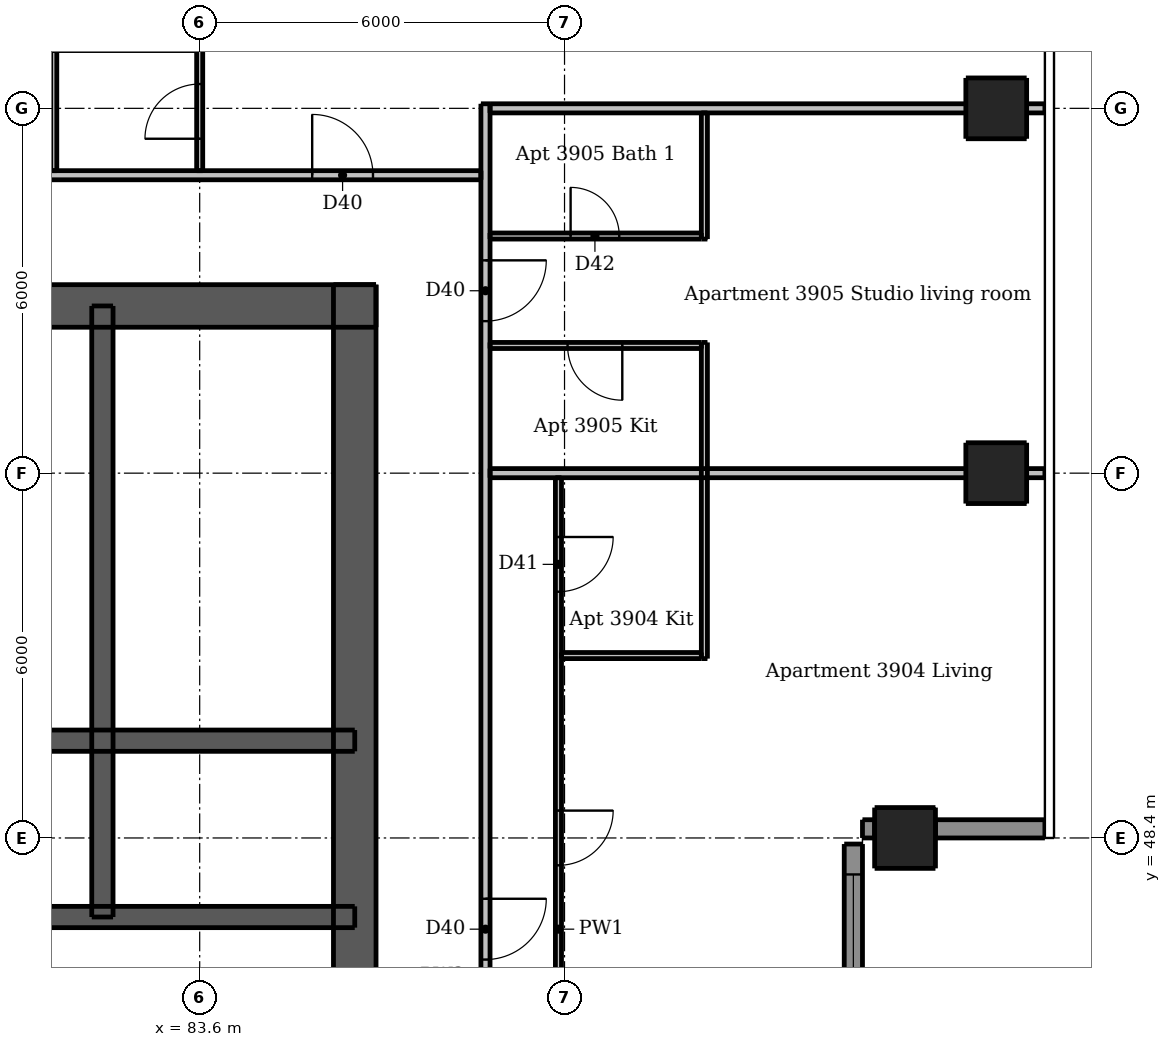
"""IFC4 building model, lengths in metres.
Left out: names, types, materials, properties, quantities, classifications, styles, units other than length and angle.
Written with IfcOpenShell. Run it as: python <this file> out.ifc"""

import sys

from ifc_helpers import new_model, si_unit, direction, frame, frame_2d, origin, origin_2d, place, context, subcontext, project, spatial, rectangle, extrude, element, fill, save


model = new_model("IFC4")
c1 = context("Model", 3, precision=1e-05, world=origin(), true_north=direction((0.0, 1.0)))
c2 = subcontext(c1, "Body", "Model", "MODEL_VIEW")
j1 = project(units=[si_unit("LENGTHUNIT", "METRE"), si_unit("PLANEANGLEUNIT", "RADIAN")], contexts=[c1])
p1 = place(None, origin())
s1 = spatial("IfcSite", under=j1, at=p1, CompositionType="ELEMENT")
p2 = place(p1, origin())
s2 = spatial("IfcBuilding", under=s1, at=p2, CompositionType="ELEMENT")
p3 = place(p2, frame((0.0, 0.0, 147.1)))
s3 = spatial("IfcBuildingStorey", under=s2, at=p3, CompositionType="ELEMENT", Elevation=147.1)
p4 = place(p3, frame((62.5, 57.15, 0.0), z_axis=(0.0, 0.0, 1.0), x_axis=(1.0, 0.0, 0.0)))
e1 = element("IfcWall", 1, at=p4, inside=s3, PredefinedType="SHEAR", context=c2, shape_type="SweptSolid", body=[
    extrude(rectangle(XDim=24.0, YDim=0.7, at=frame_2d((12.0, 0.0))), origin(), (0.0, 0.0, 1.0), 3.0),
])
p5 = place(p4, frame((20.938, 0.0, 0.0)))
e2 = element("IfcOpeningElement", 2, at=p5, cuts=e1, PredefinedType="OPENING", context=c2, shape_type="SweptSolid", body=[
    extrude(rectangle(XDim=1.1, YDim=2.1, at=frame_2d((0.55, 1.05))), frame((0.0, 0.36, 0.0), z_axis=(0.0, -1.0, 0.0), x_axis=(1.0, 0.0, 0.0)), (0.0, 0.0, 1.0), 0.72),
])
p6 = place(p4, frame((1.962, 0.0, 0.0)))
e3 = element("IfcOpeningElement", 3, at=p6, cuts=e1, PredefinedType="OPENING", context=c2, shape_type="SweptSolid", body=[
    extrude(rectangle(XDim=1.1, YDim=2.1, at=frame_2d((0.55, 1.05))), frame((0.0, 0.36, 0.0), z_axis=(0.0, -1.0, 0.0), x_axis=(1.0, 0.0, 0.0)), (0.0, 0.0, 1.0), 0.72),
])
p7 = place(p4, frame((7.887, 0.0, 0.0)))
e4 = element("IfcOpeningElement", 4, at=p7, cuts=e1, PredefinedType="OPENING", context=c2, shape_type="SweptSolid", body=[
    extrude(rectangle(XDim=0.9, YDim=2.1, at=frame_2d((0.45, 1.05))), frame((0.0, 0.36, 0.0), z_axis=(0.0, -1.0, 0.0), x_axis=(1.0, 0.0, 0.0)), (0.0, 0.0, 1.0), 0.72),
])
p8 = place(p4, frame((15.212, 0.0, 0.0)))
e5 = element("IfcOpeningElement", 5, at=p8, cuts=e1, PredefinedType="OPENING", context=c2, shape_type="SweptSolid", body=[
    extrude(rectangle(XDim=0.9, YDim=2.1, at=frame_2d((0.45, 1.05))), frame((0.0, 0.36, 0.0), z_axis=(0.0, -1.0, 0.0), x_axis=(1.0, 0.0, 0.0)), (0.0, 0.0, 1.0), 0.72),
])
p9 = place(p3, frame((86.15, 33.5, 0.0), z_axis=(0.0, 0.0, 1.0), x_axis=(0.0, 1.0, 0.0)))
e6 = element("IfcWall", 6, at=p9, inside=s3, PredefinedType="SHEAR", context=c2, shape_type="SweptSolid", body=[
    extrude(rectangle(XDim=24.0, YDim=0.7, at=frame_2d((12.0, 0.0))), origin(), (0.0, 0.0, 1.0), 3.0),
])
p10 = place(p9, frame((11.2, 0.0, 0.0)))
e7 = element("IfcOpeningElement", 7, at=p10, cuts=e6, PredefinedType="OPENING", context=c2, shape_type="SweptSolid", body=[
    extrude(rectangle(XDim=1.6, YDim=2.1, at=frame_2d((0.8, 1.05))), frame((0.0, 0.36, 0.0), z_axis=(0.0, -1.0, 0.0), x_axis=(1.0, 0.0, 0.0)), (0.0, 0.0, 1.0), 0.72),
])
p11 = place(p3, frame((62.85, 47.1, 0.0), z_axis=(0.0, 0.0, 1.0), x_axis=(1.0, 0.0, 0.0)))
e8 = element("IfcWall", 8, at=p11, inside=s3, PredefinedType="SHEAR", context=c2, shape_type="SweptSolid", body=[
    extrude(rectangle(XDim=23.3, YDim=0.35, at=frame_2d((11.65, 0.0))), origin(), (0.0, 0.0, 1.0), 3.0),
])
p12 = place(p11, frame((1.06, 0.0, 0.0)))
e9 = element("IfcOpeningElement", 9, at=p12, cuts=e8, PredefinedType="OPENING", context=c2, shape_type="SweptSolid", body=[
    extrude(rectangle(XDim=0.9, YDim=2.1, at=frame_2d((0.45, 1.05))), frame((0.0, 0.185, 0.0), z_axis=(0.0, -1.0, 0.0), x_axis=(1.0, 0.0, 0.0)), (0.0, 0.0, 1.0), 0.37),
])
p13 = place(p11, frame((2.923, 0.0, 0.0)))
e10 = element("IfcOpeningElement", 10, at=p13, cuts=e8, PredefinedType="OPENING", context=c2, shape_type="SweptSolid", body=[
    extrude(rectangle(XDim=0.8, YDim=2.1, at=frame_2d((0.4, 1.05))), frame((0.0, 0.185, 0.0), z_axis=(0.0, -1.0, 0.0), x_axis=(1.0, 0.0, 0.0)), (0.0, 0.0, 1.0), 0.37),
])
p14 = place(p11, frame((20.688, 0.0, 0.0)))
e11 = element("IfcOpeningElement", 11, at=p14, cuts=e8, PredefinedType="OPENING", context=c2, shape_type="SweptSolid", body=[
    extrude(rectangle(XDim=0.9, YDim=2.1, at=frame_2d((0.45, 1.05))), frame((0.0, 0.185, 0.0), z_axis=(0.0, -1.0, 0.0), x_axis=(1.0, 0.0, 0.0)), (0.0, 0.0, 1.0), 0.37),
])
p15 = place(p3, frame((62.85, 50.0, 0.0), z_axis=(0.0, 0.0, 1.0), x_axis=(1.0, 0.0, 0.0)))
e12 = element("IfcWall", 12, at=p15, inside=s3, PredefinedType="SHEAR", context=c2, shape_type="SweptSolid", body=[
    extrude(rectangle(XDim=23.3, YDim=0.35, at=frame_2d((11.65, 0.0))), origin(), (0.0, 0.0, 1.0), 3.0),
])
p16 = place(p3, frame((82.0, 47.1, 0.0), z_axis=(0.0, 0.0, 1.0), x_axis=(0.0, 1.0, 0.0)))
e13 = element("IfcWall", 13, at=p16, inside=s3, PredefinedType="SHEAR", context=c2, shape_type="SweptSolid", body=[
    extrude(rectangle(XDim=10.05, YDim=0.35, at=frame_2d((5.025, 0.0))), origin(), (0.0, 0.0, 1.0), 3.0),
])
for number, where, z_axis, x_axis in (
    (14, (95.2, 48.4, 0.0), (0.0, 0.0, 1.0), (1.0, 0.0, 0.0)),
    (15, (96.7, 54.4, 0.0), (0.0, 0.0, 1.0), (1.0, 0.0, 0.0)),
    (16, (96.7, 60.4, 0.0), (0.0, 0.0, 1.0), (1.0, 0.0, 0.0)),
):
    element("IfcColumn", number, at=place(p3, frame(where, z_axis=z_axis, x_axis=x_axis)), inside=s3, PredefinedType="COLUMN", context=c2, shape_type="SweptSolid", body=[
        extrude(rectangle(XDim=1.0, YDim=1.0, at=origin_2d()), origin(), (0.0, 0.0, 1.0), 3.0),
    ])
p17 = place(p3, frame((94.5, 48.55, 0.0), z_axis=(0.0, 0.0, 1.0), x_axis=(1.0, 0.0, 0.0)))
e17 = element("IfcWall", 17, at=p17, inside=s3, PredefinedType="SOLIDWALL", context=c2, shape_type="SweptSolid", body=[
    extrude(rectangle(XDim=0.2, YDim=0.3, at=frame_2d((0.1, 0.0))), origin(), (0.0, 0.0, 1.0), 3.0),
])
p18 = place(p3, frame((95.7, 48.55, 0.0), z_axis=(0.0, 0.0, 1.0), x_axis=(1.0, 0.0, 0.0)))
e18 = element("IfcWall", 18, at=p18, inside=s3, PredefinedType="SOLIDWALL", context=c2, shape_type="SweptSolid", body=[
    extrude(rectangle(XDim=1.8, YDim=0.3, at=frame_2d((0.9, 0.0))), origin(), (0.0, 0.0, 1.0), 3.0),
])
p19 = place(p3, frame((94.35, 42.5, 0.0), z_axis=(0.0, 0.0, 1.0), x_axis=(0.0, 1.0, 0.0)))
e19 = element("IfcWall", 19, at=p19, inside=s3, PredefinedType="SOLIDWALL", context=c2, shape_type="SweptSolid", body=[
    extrude(rectangle(XDim=5.8, YDim=0.3, at=frame_2d((2.9, 0.0))), origin(), (0.0, 0.0, 1.0), 3.0),
])
p20 = place(p19, frame((0.5, 0.0, 0.15)))
e20 = element("IfcOpeningElement", 20, at=p20, cuts=e19, PredefinedType="OPENING", context=c2, shape_type="SweptSolid", body=[
    extrude(rectangle(XDim=1.8, YDim=2.1, at=frame_2d((0.9, 1.05))), frame((0.0, 0.16, 0.0), z_axis=(0.0, -1.0, 0.0), x_axis=(1.0, 0.0, 0.0)), (0.0, 0.0, 1.0), 0.32),
])
p21 = place(p19, frame((3.5, 0.0, 0.15)))
e21 = element("IfcOpeningElement", 21, at=p21, cuts=e19, PredefinedType="OPENING", context=c2, shape_type="SweptSolid", body=[
    extrude(rectangle(XDim=1.8, YDim=2.1, at=frame_2d((0.9, 1.05))), frame((0.0, 0.16, 0.0), z_axis=(0.0, -1.0, 0.0), x_axis=(1.0, 0.0, 0.0)), (0.0, 0.0, 1.0), 0.32),
])
p22 = place(p3, frame((81.2, 59.375, 0.0), z_axis=(0.0, 0.0, 1.0), x_axis=(0.0, 1.0, 0.0)))
e22 = element("IfcWall", 22, at=p22, inside=s3, PredefinedType="PARTITIONING", context=c2, shape_type="SweptSolid", body=[
    extrude(rectangle(XDim=1.975, YDim=0.1, at=frame_2d((0.988, 0.0))), origin(), (0.0, 0.0, 1.0), 3.0),
])
p23 = place(p3, frame((83.6, 59.375, 0.0), z_axis=(0.0, 0.0, 1.0), x_axis=(0.0, 1.0, 0.0)))
e23 = element("IfcWall", 23, at=p23, inside=s3, PredefinedType="PARTITIONING", context=c2, shape_type="SweptSolid", body=[
    extrude(rectangle(XDim=8.625, YDim=0.1, at=frame_2d((4.312, 0.0))), origin(), (0.0, 0.0, 1.0), 2.466),
])
p24 = place(p23, frame((0.525, 0.0, 0.0)))
e24 = element("IfcOpeningElement", 24, at=p24, cuts=e23, PredefinedType="OPENING", context=c2, shape_type="SweptSolid", body=[
    extrude(rectangle(XDim=0.9, YDim=2.1, at=frame_2d((0.45, 1.05))), frame((0.0, 0.06, 0.0), z_axis=(0.0, -1.0, 0.0), x_axis=(1.0, 0.0, 0.0)), (0.0, 0.0, 1.0), 0.12),
])
p25 = place(p23, frame((4.875, 0.0, 0.0)))
e25 = element("IfcOpeningElement", 25, at=p25, cuts=e23, PredefinedType="OPENING", context=c2, shape_type="SweptSolid", body=[
    extrude(rectangle(XDim=0.9, YDim=2.1, at=frame_2d((0.45, 1.05))), frame((0.0, 0.06, 0.0), z_axis=(0.0, -1.0, 0.0), x_axis=(1.0, 0.0, 0.0)), (0.0, 0.0, 1.0), 0.12),
])
p26 = place(p3, frame((89.5, 54.325, 0.0), z_axis=(0.0, 0.0, 1.0), x_axis=(0.0, -1.0, 0.0)))
e26 = element("IfcWall", 26, at=p26, inside=s3, PredefinedType="PARTITIONING", context=c2, shape_type="SweptSolid", body=[
    extrude(rectangle(XDim=14.85, YDim=0.1, at=frame_2d((7.425, 0.0))), origin(), (0.0, 0.0, 1.0), 3.0),
])
p27 = place(p26, frame((5.475, 0.0, 0.0)))
e27 = element("IfcOpeningElement", 27, at=p27, cuts=e26, PredefinedType="OPENING", context=c2, shape_type="SweptSolid", body=[
    extrude(rectangle(XDim=0.9, YDim=2.1, at=frame_2d((0.45, 1.05))), frame((0.0, 0.06, 0.0), z_axis=(0.0, -1.0, 0.0), x_axis=(1.0, 0.0, 0.0)), (0.0, 0.0, 1.0), 0.12),
])
p28 = place(p26, frame((0.975, 0.0, 0.0)))
e28 = element("IfcOpeningElement", 28, at=p28, cuts=e26, PredefinedType="OPENING", context=c2, shape_type="SweptSolid", body=[
    extrude(rectangle(XDim=0.9, YDim=2.1, at=frame_2d((0.45, 1.05))), frame((0.0, 0.06, 0.0), z_axis=(0.0, -1.0, 0.0), x_axis=(1.0, 0.0, 0.0)), (0.0, 0.0, 1.0), 0.12),
])
p29 = place(p26, frame((12.675, 0.0, 0.0)))
e29 = element("IfcOpeningElement", 29, at=p29, cuts=e26, PredefinedType="OPENING", context=c2, shape_type="SweptSolid", body=[
    extrude(rectangle(XDim=0.9, YDim=2.1, at=frame_2d((0.45, 1.05))), frame((0.0, 0.06, 0.0), z_axis=(0.0, -1.0, 0.0), x_axis=(1.0, 0.0, 0.0)), (0.0, 0.0, 1.0), 0.12),
])
p30 = place(p26, frame((9.725, 0.0, 0.0)))
e30 = element("IfcOpeningElement", 30, at=p30, cuts=e26, PredefinedType="OPENING", context=c2, shape_type="SweptSolid", body=[
    extrude(rectangle(XDim=0.8, YDim=2.1, at=frame_2d((0.4, 1.05))), frame((0.0, 0.06, 0.0), z_axis=(0.0, -1.0, 0.0), x_axis=(1.0, 0.0, 0.0)), (0.0, 0.0, 1.0), 0.12),
])
p31 = place(p3, frame((91.9, 51.35, 0.0), z_axis=(0.0, 0.0, 1.0), x_axis=(0.0, 1.0, 0.0)))
e31 = element("IfcWall", 31, at=p31, inside=s3, PredefinedType="PARTITIONING", context=c2, shape_type="SweptSolid", body=[
    extrude(rectangle(XDim=5.2, YDim=0.1, at=frame_2d((2.6, 0.0))), origin(), (0.0, 0.0, 1.0), 3.0),
])
p32 = place(p3, frame((91.9, 58.25, 0.0), z_axis=(0.0, 0.0, 1.0), x_axis=(0.0, 1.0, 0.0)))
e32 = element("IfcWall", 32, at=p32, inside=s3, PredefinedType="PARTITIONING", context=c2, shape_type="SweptSolid", body=[
    extrude(rectangle(XDim=2.075, YDim=0.1, at=frame_2d((1.038, 0.0))), origin(), (0.0, 0.0, 1.0), 3.0),
])
p33 = place(p3, frame((88.375, 58.3, 0.0), z_axis=(0.0, 0.0, 1.0), x_axis=(1.0, 0.0, 0.0)))
e33 = element("IfcWall", 33, at=p33, inside=s3, PredefinedType="PARTITIONING", context=c2, shape_type="SweptSolid", body=[
    extrude(rectangle(XDim=3.475, YDim=0.1, at=frame_2d((1.738, 0.0))), origin(), (0.0, 0.0, 1.0), 3.0),
])
p34 = place(p33, frame((1.325, 0.0, 0.0)))
e34 = element("IfcOpeningElement", 34, at=p34, cuts=e33, PredefinedType="OPENING", context=c2, shape_type="SweptSolid", body=[
    extrude(rectangle(XDim=0.8, YDim=2.1, at=frame_2d((0.4, 1.05))), frame((0.0, 0.06, 0.0), z_axis=(0.0, -1.0, 0.0), x_axis=(1.0, 0.0, 0.0)), (0.0, 0.0, 1.0), 0.12),
])
p35 = place(p3, frame((91.85, 56.5, 0.0), z_axis=(0.0, 0.0, 1.0), x_axis=(-1.0, 0.0, 0.0)))
e35 = element("IfcWall", 35, at=p35, inside=s3, PredefinedType="PARTITIONING", context=c2, shape_type="SweptSolid", body=[
    extrude(rectangle(XDim=3.475, YDim=0.1, at=frame_2d((1.738, 0.0))), origin(), (0.0, 0.0, 1.0), 3.0),
])
p36 = place(p35, frame((1.3, 0.0, 0.0)))
e36 = element("IfcOpeningElement", 36, at=p36, cuts=e35, PredefinedType="OPENING", context=c2, shape_type="SweptSolid", body=[
    extrude(rectangle(XDim=0.9, YDim=2.1, at=frame_2d((0.45, 1.05))), frame((0.0, 0.06, 0.0), z_axis=(0.0, -1.0, 0.0), x_axis=(1.0, 0.0, 0.0)), (0.0, 0.0, 1.0), 0.12),
])
p37 = place(p3, frame((89.55, 51.4, 0.0), z_axis=(0.0, 0.0, 1.0), x_axis=(1.0, 0.0, 0.0)))
e37 = element("IfcWall", 37, at=p37, inside=s3, PredefinedType="PARTITIONING", context=c2, shape_type="SweptSolid", body=[
    extrude(rectangle(XDim=2.3, YDim=0.1, at=frame_2d((1.15, 0.0))), origin(), (0.0, 0.0, 1.0), 3.0),
])
p38 = place(p3, frame((88.3, 60.475, 0.0), z_axis=(0.0, 0.0, 1.0), x_axis=(0.0, -1.0, 0.0)))
e38 = element("IfcWall", 38, at=p38, inside=s3, PredefinedType="PARTITIONING", context=c2, shape_type="SweptSolid", body=[
    extrude(rectangle(XDim=28.7, YDim=0.15, at=frame_2d((14.35, 0.0))), origin(), (0.0, 0.0, 1.0), 3.0),
])
p39 = place(p38, frame((27.425, 0.0, 0.0)))
e39 = element("IfcOpeningElement", 39, at=p39, cuts=e38, PredefinedType="OPENING", context=c2, shape_type="SweptSolid", body=[
    extrude(rectangle(XDim=1.0, YDim=2.1, at=frame_2d((0.5, 1.05))), frame((0.0, 0.085, 0.0), z_axis=(0.0, -1.0, 0.0), x_axis=(1.0, 0.0, 0.0)), (0.0, 0.0, 1.0), 0.17),
])
p40 = place(p38, frame((13.075, 0.0, 0.0)))
e40 = element("IfcOpeningElement", 40, at=p40, cuts=e38, PredefinedType="OPENING", context=c2, shape_type="SweptSolid", body=[
    extrude(rectangle(XDim=1.0, YDim=2.1, at=frame_2d((0.5, 1.05))), frame((0.0, 0.085, 0.0), z_axis=(0.0, -1.0, 0.0), x_axis=(1.0, 0.0, 0.0)), (0.0, 0.0, 1.0), 0.17),
])
p41 = place(p38, frame((2.575, 0.0, 0.0)))
e41 = element("IfcOpeningElement", 41, at=p41, cuts=e38, PredefinedType="OPENING", context=c2, shape_type="SweptSolid", body=[
    extrude(rectangle(XDim=1.0, YDim=2.1, at=frame_2d((0.5, 1.05))), frame((0.0, 0.085, 0.0), z_axis=(0.0, -1.0, 0.0), x_axis=(1.0, 0.0, 0.0)), (0.0, 0.0, 1.0), 0.17),
])
p42 = place(p3, frame((88.375, 60.4, 0.0), z_axis=(0.0, 0.0, 1.0), x_axis=(1.0, 0.0, 0.0)))
e42 = element("IfcWall", 42, at=p42, inside=s3, PredefinedType="PARTITIONING", context=c2, shape_type="SweptSolid", body=[
    extrude(rectangle(XDim=9.125, YDim=0.15, at=frame_2d((4.562, 0.0))), origin(), (0.0, 0.0, 1.0), 2.597),
])
p43 = place(p3, frame((59.675, 59.3, 0.0), z_axis=(0.0, 0.0, 1.0), x_axis=(1.0, 0.0, 0.0)))
e43 = element("IfcWall", 43, at=p43, inside=s3, PredefinedType="PARTITIONING", context=c2, shape_type="SweptSolid", body=[
    extrude(rectangle(XDim=28.55, YDim=0.15, at=frame_2d((14.275, 0.0))), origin(), (0.0, 0.0, 1.0), 3.0),
])
p44 = place(p43, frame((8.975, 0.0, 0.0)))
e44 = element("IfcOpeningElement", 44, at=p44, cuts=e43, PredefinedType="OPENING", context=c2, shape_type="SweptSolid", body=[
    extrude(rectangle(XDim=1.0, YDim=2.1, at=frame_2d((0.5, 1.05))), frame((0.0, 0.085, 0.0), z_axis=(0.0, -1.0, 0.0), x_axis=(1.0, 0.0, 0.0)), (0.0, 0.0, 1.0), 0.17),
])
p45 = place(p43, frame((25.775, 0.0, 0.0)))
e45 = element("IfcOpeningElement", 45, at=p45, cuts=e43, PredefinedType="OPENING", context=c2, shape_type="SweptSolid", body=[
    extrude(rectangle(XDim=1.0, YDim=2.1, at=frame_2d((0.5, 1.05))), frame((0.0, 0.085, 0.0), z_axis=(0.0, -1.0, 0.0), x_axis=(1.0, 0.0, 0.0)), (0.0, 0.0, 1.0), 0.17),
])
p46 = place(p3, frame((88.375, 54.4, 0.0), z_axis=(0.0, 0.0, 1.0), x_axis=(1.0, 0.0, 0.0)))
e46 = element("IfcWall", 46, at=p46, inside=s3, PredefinedType="PARTITIONING", context=c2, shape_type="SweptSolid", body=[
    extrude(rectangle(XDim=9.125, YDim=0.15, at=frame_2d((4.562, 0.0))), origin(), (0.0, 0.0, 1.0), 2.466),
])
p47 = place(p21, origin())
e47 = element("IfcWindow", 47, at=p47, inside=s3, PartitioningType="DOUBLE_PANEL_VERTICAL", PredefinedType="WINDOW", context=c2, shape_type="SweptSolid", body=[
    extrude(rectangle(XDim=1.8, YDim=2.1, at=frame_2d((0.9, 1.05))), frame((0.0, 0.03, 0.0), z_axis=(0.0, -1.0, 0.0), x_axis=(1.0, 0.0, 0.0)), (0.0, 0.0, 1.0), 0.06),
])
fill(e21, e47)
p48 = place(p5, origin())
e48 = element("IfcDoor", 48, at=p48, inside=s3, OperationType="SINGLE_SWING_RIGHT", PredefinedType="DOOR", context=c2, shape_type="SweptSolid", body=[
    extrude(rectangle(XDim=1.1, YDim=2.1, at=frame_2d((0.55, 1.05))), frame((0.0, -0.288, 0.0), z_axis=(0.0, -1.0, 0.0), x_axis=(1.0, 0.0, 0.0)), (0.0, 0.0, 1.0), 0.05),
])
fill(e2, e48)
p49 = place(p10, origin())
e49 = element("IfcDoor", 49, at=p49, inside=s3, OperationType="DOUBLE_DOOR_SINGLE_SWING", PredefinedType="DOOR", context=c2, shape_type="SweptSolid", body=[
    extrude(rectangle(XDim=1.6, YDim=2.1, at=frame_2d((0.8, 1.05))), frame((0.0, 0.337, 0.0), z_axis=(0.0, -1.0, 0.0), x_axis=(1.0, 0.0, 0.0)), (0.0, 0.0, 1.0), 0.05),
])
fill(e7, e49)
p50 = place(p14, origin())
e50 = element("IfcDoor", 50, at=p50, inside=s3, OperationType="SINGLE_SWING_LEFT", PredefinedType="DOOR", context=c2, shape_type="SweptSolid", body=[
    extrude(rectangle(XDim=0.9, YDim=2.1, at=frame_2d((0.45, 1.05))), frame((0.0, 0.163, 0.0), z_axis=(0.0, -1.0, 0.0), x_axis=(1.0, 0.0, 0.0)), (0.0, 0.0, 1.0), 0.05),
])
fill(e11, e50)
p51 = place(p40, origin())
e51 = element("IfcDoor", 51, at=p51, inside=s3, OperationType="SINGLE_SWING_LEFT", PredefinedType="DOOR", context=c2, shape_type="SweptSolid", body=[
    extrude(rectangle(XDim=1.0, YDim=2.1, at=frame_2d((0.5, 1.05))), frame((0.0, 0.025, 0.0), z_axis=(0.0, -1.0, 0.0), x_axis=(1.0, 0.0, 0.0)), (0.0, 0.0, 1.0), 0.05),
])
fill(e40, e51)
p52 = place(p27, origin())
e52 = element("IfcDoor", 52, at=p52, inside=s3, OperationType="SINGLE_SWING_LEFT", PredefinedType="DOOR", context=c2, shape_type="SweptSolid", body=[
    extrude(rectangle(XDim=0.9, YDim=2.1, at=frame_2d((0.45, 1.05))), frame((0.0, 0.025, 0.0), z_axis=(0.0, -1.0, 0.0), x_axis=(1.0, 0.0, 0.0)), (0.0, 0.0, 1.0), 0.05),
])
fill(e27, e52)
p53 = place(p28, origin())
e53 = element("IfcDoor", 53, at=p53, inside=s3, OperationType="SINGLE_SWING_LEFT", PredefinedType="DOOR", context=c2, shape_type="SweptSolid", body=[
    extrude(rectangle(XDim=0.9, YDim=2.1, at=frame_2d((0.45, 1.05))), frame((0.0, 0.025, 0.0), z_axis=(0.0, -1.0, 0.0), x_axis=(1.0, 0.0, 0.0)), (0.0, 0.0, 1.0), 0.05),
])
fill(e28, e53)
p54 = place(p41, origin())
e54 = element("IfcDoor", 54, at=p54, inside=s3, OperationType="SINGLE_SWING_LEFT", PredefinedType="DOOR", context=c2, shape_type="SweptSolid", body=[
    extrude(rectangle(XDim=1.0, YDim=2.1, at=frame_2d((0.5, 1.05))), frame((0.0, 0.025, 0.0), z_axis=(0.0, -1.0, 0.0), x_axis=(1.0, 0.0, 0.0)), (0.0, 0.0, 1.0), 0.05),
])
fill(e41, e54)
p55 = place(p36, origin())
e55 = element("IfcDoor", 55, at=p55, inside=s3, OperationType="SINGLE_SWING_LEFT", PredefinedType="DOOR", context=c2, shape_type="SweptSolid", body=[
    extrude(rectangle(XDim=0.9, YDim=2.1, at=frame_2d((0.45, 1.05))), frame((0.0, 0.025, 0.0), z_axis=(0.0, -1.0, 0.0), x_axis=(1.0, 0.0, 0.0)), (0.0, 0.0, 1.0), 0.05),
])
fill(e36, e55)
p56 = place(p34, origin())
e56 = element("IfcDoor", 56, at=p56, inside=s3, OperationType="SINGLE_SWING_LEFT", PredefinedType="DOOR", context=c2, shape_type="SweptSolid", body=[
    extrude(rectangle(XDim=0.8, YDim=2.1, at=frame_2d((0.4, 1.05))), frame((0.0, 0.025, 0.0), z_axis=(0.0, -1.0, 0.0), x_axis=(1.0, 0.0, 0.0)), (0.0, 0.0, 1.0), 0.05),
])
fill(e34, e56)
p57 = place(p45, origin())
e57 = element("IfcDoor", 57, at=p57, inside=s3, OperationType="SINGLE_SWING_LEFT", PredefinedType="DOOR", context=c2, shape_type="SweptSolid", body=[
    extrude(rectangle(XDim=1.0, YDim=2.1, at=frame_2d((0.5, 1.05))), frame((0.0, 0.025, 0.0), z_axis=(0.0, -1.0, 0.0), x_axis=(1.0, 0.0, 0.0)), (0.0, 0.0, 1.0), 0.05),
])
fill(e45, e57)
p58 = place(p24, origin())
e58 = element("IfcDoor", 58, at=p58, inside=s3, OperationType="SINGLE_SWING_LEFT", PredefinedType="DOOR", context=c2, shape_type="SweptSolid", body=[
    extrude(rectangle(XDim=0.9, YDim=2.1, at=frame_2d((0.45, 1.05))), frame((0.0, 0.025, 0.0), z_axis=(0.0, -1.0, 0.0), x_axis=(1.0, 0.0, 0.0)), (0.0, 0.0, 1.0), 0.05),
])
fill(e24, e58)
save(model, sys.argv[1])
